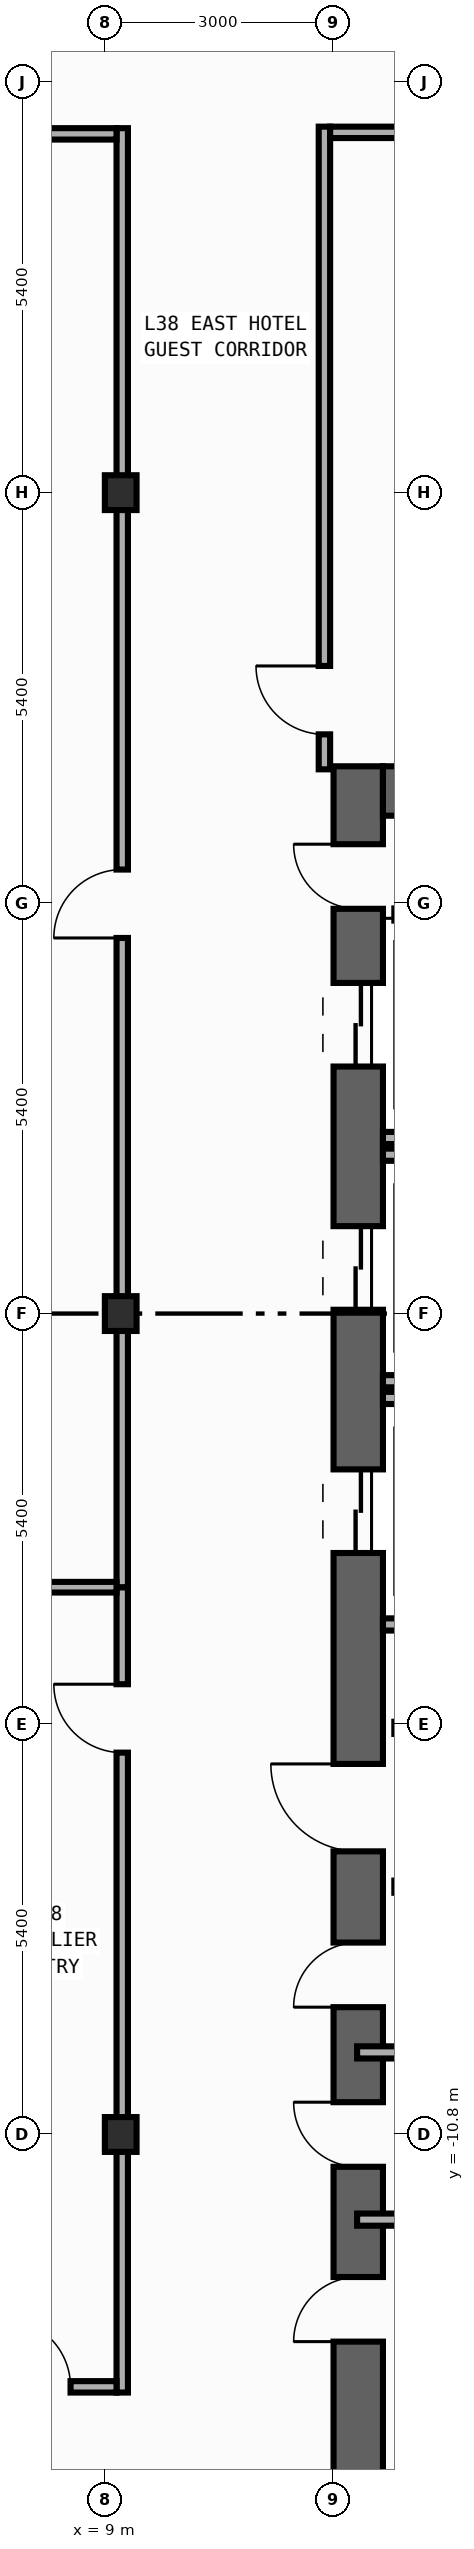
"""IFC4 building model, lengths in metres.
Left out: names, types, materials, properties, quantities, classifications, styles, units other than length and angle.
Written with IfcOpenShell. Run it as: python <this file> out.ifc"""

import sys

from ifc_helpers import new_model, si_unit, direction, frame, frame_2d, origin, origin_2d, place, context, subcontext, project, spatial, rectangle, i_section, extrude, element, fill, save


model = new_model("IFC4")
c1 = context("Model", 3, precision=1e-05, world=origin(), true_north=direction((0.0, 1.0)))
c2 = subcontext(c1, "Body", "Model", "MODEL_VIEW")
j1 = project(units=[si_unit("LENGTHUNIT", "METRE"), si_unit("PLANEANGLEUNIT", "RADIAN")], contexts=[c1])
p1 = place(None, origin())
s1 = spatial("IfcSite", under=j1, at=p1, CompositionType="ELEMENT")
p2 = place(p1, origin())
s2 = spatial("IfcBuilding", under=s1, at=p2, CompositionType="ELEMENT")
p3 = place(p2, frame((0.0, 0.0, 168.8)))
s3 = spatial("IfcBuildingStorey", under=s2, at=p3, CompositionType="ELEMENT", Elevation=168.8)
p4 = place(p3, frame((12.325, -19.8, 0.0), z_axis=(0.0, 0.0, 1.0), x_axis=(0.0, 1.0, 0.0)))
e1 = element("IfcWall", 1, at=p4, inside=s3, PredefinedType="SHEAR", context=c2, shape_type="SweptSolid", body=[
    extrude(rectangle(XDim=27.0, YDim=0.65, at=frame_2d((13.5, 0.0))), origin(), (0.0, 0.0, 1.0), 3.54),
])
p5 = place(p4, frame((23.05, 0.0, 0.0)))
e2 = element("IfcOpeningElement", 2, at=p5, cuts=e1, PredefinedType="OPENING", context=c2, shape_type="SweptSolid", body=[
    extrude(rectangle(XDim=1.1, YDim=2.2, at=frame_2d((0.55, 1.1))), frame((0.0, 0.335, 0.0), z_axis=(0.0, -1.0, 0.0), x_axis=(1.0, 0.0, 0.0)), (0.0, 0.0, 1.0), 0.67),
])
p6 = place(p4, frame((19.85, 0.0, 0.0)))
e3 = element("IfcOpeningElement", 3, at=p6, cuts=e1, PredefinedType="OPENING", context=c2, shape_type="SweptSolid", body=[
    extrude(rectangle(XDim=1.1, YDim=2.2, at=frame_2d((0.55, 1.1))), frame((0.0, 0.335, 0.0), z_axis=(0.0, -1.0, 0.0), x_axis=(1.0, 0.0, 0.0)), (0.0, 0.0, 1.0), 0.67),
])
p7 = place(p4, frame((16.65, 0.0, 0.0)))
e4 = element("IfcOpeningElement", 4, at=p7, cuts=e1, PredefinedType="OPENING", context=c2, shape_type="SweptSolid", body=[
    extrude(rectangle(XDim=1.1, YDim=2.2, at=frame_2d((0.55, 1.1))), frame((0.0, 0.335, 0.0), z_axis=(0.0, -1.0, 0.0), x_axis=(1.0, 0.0, 0.0)), (0.0, 0.0, 1.0), 0.67),
])
p8 = place(p4, frame((6.275, 0.0, 0.0)))
e5 = element("IfcOpeningElement", 5, at=p8, cuts=e1, PredefinedType="OPENING", context=c2, shape_type="SweptSolid", body=[
    extrude(rectangle(XDim=0.85, YDim=2.1, at=frame_2d((0.425, 1.05))), frame((0.0, 0.335, 0.0), z_axis=(0.0, -1.0, 0.0), x_axis=(1.0, 0.0, 0.0)), (0.0, 0.0, 1.0), 0.67),
])
p9 = place(p4, frame((8.575, 0.0, 0.0)))
e6 = element("IfcOpeningElement", 6, at=p9, cuts=e1, PredefinedType="OPENING", context=c2, shape_type="SweptSolid", body=[
    extrude(rectangle(XDim=0.85, YDim=2.1, at=frame_2d((0.425, 1.05))), frame((0.0, 0.335, 0.0), z_axis=(0.0, -1.0, 0.0), x_axis=(1.0, 0.0, 0.0)), (0.0, 0.0, 1.0), 0.67),
])
p10 = place(p4, frame((10.675, 0.0, 0.0)))
e7 = element("IfcOpeningElement", 7, at=p10, cuts=e1, PredefinedType="OPENING", context=c2, shape_type="SweptSolid", body=[
    extrude(rectangle(XDim=0.85, YDim=2.1, at=frame_2d((0.425, 1.05))), frame((0.0, 0.335, 0.0), z_axis=(0.0, -1.0, 0.0), x_axis=(1.0, 0.0, 0.0)), (0.0, 0.0, 1.0), 0.67),
])
p11 = place(p4, frame((12.725, 0.0, 0.0)))
e8 = element("IfcOpeningElement", 8, at=p11, cuts=e1, PredefinedType="OPENING", context=c2, shape_type="SweptSolid", body=[
    extrude(rectangle(XDim=1.15, YDim=2.2, at=frame_2d((0.575, 1.1))), frame((0.0, 0.335, 0.0), z_axis=(0.0, -1.0, 0.0), x_axis=(1.0, 0.0, 0.0)), (0.0, 0.0, 1.0), 0.67),
])
p12 = place(p4, frame((25.125, 0.0, 0.0)))
e9 = element("IfcOpeningElement", 9, at=p12, cuts=e1, PredefinedType="OPENING", context=c2, shape_type="SweptSolid", body=[
    extrude(rectangle(XDim=0.85, YDim=2.1, at=frame_2d((0.425, 1.05))), frame((0.0, 0.335, 0.0), z_axis=(0.0, -1.0, 0.0), x_axis=(1.0, 0.0, 0.0)), (0.0, 0.0, 1.0), 0.67),
])
p13 = place(p3, frame((12.65, 6.875, 0.0), z_axis=(0.0, 0.0, 1.0), x_axis=(1.0, 0.0, 0.0)))
e10 = element("IfcWall", 10, at=p13, inside=s3, PredefinedType="SHEAR", context=c2, shape_type="SweptSolid", body=[
    extrude(rectangle(XDim=7.1, YDim=0.65, at=frame_2d((3.55, 0.0))), origin(), (0.0, 0.0, 1.0), 3.54),
])
for number, where, z_axis, x_axis in (
    (11, (9.2, -10.8, 0.0), (0.0, 0.0, 1.0), (1.0, 0.0, 0.0)),
    (12, (9.2, 0.0, 0.0), (0.0, 0.0, 1.0), (1.0, 0.0, 0.0)),
    (13, (9.2, 10.8, 0.0), (0.0, 0.0, 1.0), (1.0, 0.0, 0.0)),
):
    element("IfcColumn", number, at=place(p3, frame(where, z_axis=z_axis, x_axis=x_axis)), inside=s3, PredefinedType="COLUMN", context=c2, shape_type="SweptSolid", body=[
        extrude(i_section(OverallWidth=0.417, OverallDepth=0.458, WebThickness=0.03, FlangeThickness=0.05, FilletRadius=0.022, at=origin_2d()), origin(), (0.0, 0.0, 1.0), 3.8),
    ])
for number, where, z_axis, x_axis in (
    (14, (12.65, 2.31, 0.0), (0.0, 0.0, 1.0), (1.0, 0.0, 0.0)),
    (15, (12.65, -0.89, 0.0), (0.0, 0.0, 1.0), (1.0, 0.0, 0.0)),
    (16, (12.65, 2.09, 0.0), (0.0, 0.0, 1.0), (1.0, 0.0, 0.0)),
    (17, (12.65, -4.09, 0.0), (0.0, 0.0, 1.0), (1.0, 0.0, 0.0)),
    (18, (12.65, -1.11, 0.0), (0.0, 0.0, 1.0), (1.0, 0.0, 0.0)),
):
    element("IfcWall", number, at=place(p3, frame(where, z_axis=z_axis, x_axis=x_axis)), inside=s3, PredefinedType="STANDARD", context=c2, shape_type="SweptSolid", body=[
        extrude(rectangle(XDim=2.34, YDim=0.16, at=frame_2d((1.17, 0.0))), origin(), (0.0, 0.0, 1.0), 3.54),
    ])
for number, where, z_axis, x_axis in (
    (19, (12.8, -5.45, 0.0), (0.0, 0.0, 1.0), (1.0, 0.0, 0.0)),
    (20, (12.8, -7.54, 0.0), (0.0, 0.0, 1.0), (1.0, 0.0, 0.0)),
    (21, (12.8, 5.25, 0.0), (0.0, 0.0, 1.0), (1.0, 0.0, 0.0)),
):
    element("IfcWall", number, at=place(p3, frame(where, z_axis=z_axis, x_axis=x_axis)), inside=s3, PredefinedType="STANDARD", context=c2, shape_type="SweptSolid", body=[
        extrude(rectangle(XDim=2.6, YDim=0.16, at=frame_2d((1.3, 0.0))), origin(), (0.0, 0.0, 1.0), 3.54),
    ])
for number, where, z_axis, x_axis in (
    (22, (12.31, -11.92, 0.0), (0.0, 0.0, 1.0), (1.0, 0.0, 0.0)),
    (23, (12.31, -9.72, 0.0), (0.0, 0.0, 1.0), (1.0, 0.0, 0.0)),
):
    element("IfcWall", number, at=place(p3, frame(where, z_axis=z_axis, x_axis=x_axis)), inside=s3, PredefinedType="PARTITIONING", context=c2, shape_type="SweptSolid", body=[
        extrude(rectangle(XDim=3.065, YDim=0.16, at=frame_2d((1.532, 0.0))), origin(), (0.0, 0.0, 1.0), 3.54),
    ])
p14 = place(p3, frame((9.22, -14.195, 0.0), z_axis=(0.0, 0.0, 1.0), x_axis=(0.0, 1.0, 0.0)))
e24 = element("IfcWall", 24, at=p14, inside=s3, PredefinedType="PARTITIONING", context=c2, shape_type="SweptSolid", body=[
    extrude(rectangle(XDim=10.595, YDim=0.15, at=frame_2d((5.297, 0.0))), origin(), (0.0, 0.0, 1.0), 2.952),
])
p15 = place(p14, frame((8.419, 0.0, 0.0)))
e25 = element("IfcOpeningElement", 25, at=p15, cuts=e24, PredefinedType="OPENING", context=c2, shape_type="SweptSolid", body=[
    extrude(rectangle(XDim=0.9, YDim=2.15, at=frame_2d((0.45, 1.075))), frame((0.0, 0.085, 0.0), z_axis=(0.0, -1.0, 0.0), x_axis=(1.0, 0.0, 0.0)), (0.0, 0.0, 1.0), 0.17),
])
p16 = place(p3, frame((9.22, -3.6, 0.0), z_axis=(0.0, 0.0, 1.0), x_axis=(0.0, 1.0, 0.0)))
e26 = element("IfcWall", 26, at=p16, inside=s3, PredefinedType="PARTITIONING", context=c2, shape_type="SweptSolid", body=[
    extrude(rectangle(XDim=19.195, YDim=0.15, at=frame_2d((9.598, 0.0))), origin(), (0.0, 0.0, 1.0), 2.952),
])
p17 = place(p16, frame((8.542, 0.0, 0.0)))
e27 = element("IfcOpeningElement", 27, at=p17, cuts=e26, PredefinedType="OPENING", context=c2, shape_type="SweptSolid", body=[
    extrude(rectangle(XDim=0.9, YDim=2.15, at=frame_2d((0.45, 1.075))), frame((0.0, 0.085, 0.0), z_axis=(0.0, -1.0, 0.0), x_axis=(1.0, 0.0, 0.0)), (0.0, 0.0, 1.0), 0.17),
])
p18 = place(p3, frame((11.88, 7.16, 0.0), z_axis=(0.0, 0.0, 1.0), x_axis=(0.0, 1.0, 0.0)))
e28 = element("IfcWall", 28, at=p18, inside=s3, PredefinedType="PARTITIONING", context=c2, shape_type="SweptSolid", body=[
    extrude(rectangle(XDim=8.455, YDim=0.15, at=frame_2d((4.228, 0.0))), origin(), (0.0, 0.0, 1.0), 3.54),
])
p19 = place(p18, frame((0.46, 0.0, 0.0)))
e29 = element("IfcOpeningElement", 29, at=p19, cuts=e28, PredefinedType="OPENING", context=c2, shape_type="SweptSolid", body=[
    extrude(rectangle(XDim=0.9, YDim=2.15, at=frame_2d((0.45, 1.075))), frame((0.0, 0.085, 0.0), z_axis=(0.0, -1.0, 0.0), x_axis=(1.0, 0.0, 0.0)), (0.0, 0.0, 1.0), 0.17),
])
p20 = place(p3, frame((-9.145, 15.52, 0.0), z_axis=(0.0, 0.0, 1.0), x_axis=(1.0, 0.0, 0.0)))
e30 = element("IfcWall", 30, at=p20, inside=s3, PredefinedType="PARTITIONING", context=c2, shape_type="SweptSolid", body=[
    extrude(rectangle(XDim=18.29, YDim=0.15, at=frame_2d((9.145, 0.0))), origin(), (0.0, 0.0, 1.0), 3.54),
])
p21 = place(p20, frame((15.725, 0.0, 0.0)))
e31 = element("IfcOpeningElement", 31, at=p21, cuts=e30, PredefinedType="OPENING", context=c2, shape_type="SweptSolid", body=[
    extrude(rectangle(XDim=0.9, YDim=2.15, at=frame_2d((0.45, 1.075))), frame((0.0, 0.085, 0.0), z_axis=(0.0, -1.0, 0.0), x_axis=(1.0, 0.0, 0.0)), (0.0, 0.0, 1.0), 0.17),
])
p22 = place(p3, frame((11.955, 15.54, 0.0), z_axis=(0.0, 0.0, 1.0), x_axis=(1.0, 0.0, 0.0)))
e32 = element("IfcWall", 32, at=p22, inside=s3, PredefinedType="PARTITIONING", context=c2, shape_type="SweptSolid", body=[
    extrude(rectangle(XDim=10.5, YDim=0.15, at=frame_2d((5.25, 0.0))), origin(), (0.0, 0.0, 1.0), 3.54),
])
p23 = place(p22, frame((4.901, 0.0, 0.0)))
e33 = element("IfcOpeningElement", 33, at=p23, cuts=e32, PredefinedType="OPENING", context=c2, shape_type="SweptSolid", body=[
    extrude(rectangle(XDim=0.9, YDim=2.15, at=frame_2d((0.45, 1.075))), frame((0.0, 0.085, 0.0), z_axis=(0.0, -1.0, 0.0), x_axis=(1.0, 0.0, 0.0)), (0.0, 0.0, 1.0), 0.17),
])
p24 = place(p3, frame((7.18, -14.12, 0.0), z_axis=(0.0, 0.0, 1.0), x_axis=(1.0, 0.0, 0.0)))
e34 = element("IfcWall", 34, at=p24, inside=s3, PredefinedType="PARTITIONING", context=c2, shape_type="SweptSolid", body=[
    extrude(rectangle(XDim=1.965, YDim=0.15, at=frame_2d((0.982, 0.0))), origin(), (0.0, 0.0, 1.0), 3.54),
])
p25 = place(p24, frame((0.46, 0.0, 0.0)))
e35 = element("IfcOpeningElement", 35, at=p25, cuts=e34, PredefinedType="OPENING", context=c2, shape_type="SweptSolid", body=[
    extrude(rectangle(XDim=0.9, YDim=2.15, at=frame_2d((0.45, 1.075))), frame((0.0, 0.085, 0.0), z_axis=(0.0, -1.0, 0.0), x_axis=(1.0, 0.0, 0.0)), (0.0, 0.0, 1.0), 0.17),
])
p26 = place(p3, frame((7.02, -3.6, 0.0), z_axis=(0.0, 0.0, 1.0), x_axis=(1.0, 0.0, 0.0)))
e36 = element("IfcWall", 36, at=p26, inside=s3, PredefinedType="PARTITIONING", context=c2, shape_type="SweptSolid", body=[
    extrude(rectangle(XDim=2.125, YDim=0.14, at=frame_2d((1.062, 0.0))), origin(), (0.0, 0.0, 1.0), 3.54),
])
p27 = place(p5, origin())
e37 = element("IfcDoor", 37, at=p27, inside=s3, OperationType="DOUBLE_DOOR_SLIDING", PredefinedType="DOOR", context=c2, shape_type="SweptSolid", body=[
    extrude(rectangle(XDim=1.1, YDim=2.2, at=frame_2d((0.55, 1.1))), frame((0.0, 0.025, 0.0), z_axis=(0.0, -1.0, 0.0), x_axis=(1.0, 0.0, 0.0)), (0.0, 0.0, 1.0), 0.05),
])
fill(e2, e37)
p28 = place(p6, origin())
e38 = element("IfcDoor", 38, at=p28, inside=s3, OperationType="DOUBLE_DOOR_SLIDING", PredefinedType="DOOR", context=c2, shape_type="SweptSolid", body=[
    extrude(rectangle(XDim=1.1, YDim=2.2, at=frame_2d((0.55, 1.1))), frame((0.0, 0.025, 0.0), z_axis=(0.0, -1.0, 0.0), x_axis=(1.0, 0.0, 0.0)), (0.0, 0.0, 1.0), 0.05),
])
fill(e3, e38)
p29 = place(p7, origin())
e39 = element("IfcDoor", 39, at=p29, inside=s3, OperationType="DOUBLE_DOOR_SLIDING", PredefinedType="DOOR", context=c2, shape_type="SweptSolid", body=[
    extrude(rectangle(XDim=1.1, YDim=2.2, at=frame_2d((0.55, 1.1))), frame((0.0, 0.025, 0.0), z_axis=(0.0, -1.0, 0.0), x_axis=(1.0, 0.0, 0.0)), (0.0, 0.0, 1.0), 0.05),
])
fill(e4, e39)
p30 = place(p8, origin())
e40 = element("IfcDoor", 40, at=p30, inside=s3, OperationType="SINGLE_SWING_LEFT", PredefinedType="DOOR", context=c2, shape_type="SweptSolid", body=[
    extrude(rectangle(XDim=0.85, YDim=2.1, at=frame_2d((0.425, 1.05))), frame((0.0, 0.025, 0.0), z_axis=(0.0, -1.0, 0.0), x_axis=(1.0, 0.0, 0.0)), (0.0, 0.0, 1.0), 0.05),
])
fill(e5, e40)
p31 = place(p9, origin())
e41 = element("IfcDoor", 41, at=p31, inside=s3, OperationType="SINGLE_SWING_RIGHT", PredefinedType="DOOR", context=c2, shape_type="SweptSolid", body=[
    extrude(rectangle(XDim=0.85, YDim=2.1, at=frame_2d((0.425, 1.05))), frame((0.0, 0.025, 0.0), z_axis=(0.0, -1.0, 0.0), x_axis=(1.0, 0.0, 0.0)), (0.0, 0.0, 1.0), 0.05),
])
fill(e6, e41)
p32 = place(p10, origin())
e42 = element("IfcDoor", 42, at=p32, inside=s3, OperationType="SINGLE_SWING_LEFT", PredefinedType="DOOR", context=c2, shape_type="SweptSolid", body=[
    extrude(rectangle(XDim=0.85, YDim=2.1, at=frame_2d((0.425, 1.05))), frame((0.0, 0.025, 0.0), z_axis=(0.0, -1.0, 0.0), x_axis=(1.0, 0.0, 0.0)), (0.0, 0.0, 1.0), 0.05),
])
fill(e7, e42)
p33 = place(p11, origin())
e43 = element("IfcDoor", 43, at=p33, inside=s3, OperationType="SINGLE_SWING_RIGHT", PredefinedType="DOOR", context=c2, shape_type="SweptSolid", body=[
    extrude(rectangle(XDim=1.15, YDim=2.2, at=frame_2d((0.575, 1.1))), frame((0.0, 0.025, 0.0), z_axis=(0.0, -1.0, 0.0), x_axis=(1.0, 0.0, 0.0)), (0.0, 0.0, 1.0), 0.05),
])
fill(e8, e43)
p34 = place(p12, origin())
e44 = element("IfcDoor", 44, at=p34, inside=s3, OperationType="SINGLE_SWING_RIGHT", PredefinedType="DOOR", context=c2, shape_type="SweptSolid", body=[
    extrude(rectangle(XDim=0.85, YDim=2.1, at=frame_2d((0.425, 1.05))), frame((0.0, 0.025, 0.0), z_axis=(0.0, -1.0, 0.0), x_axis=(1.0, 0.0, 0.0)), (0.0, 0.0, 1.0), 0.05),
])
fill(e9, e44)
p35 = place(p15, origin())
e45 = element("IfcDoor", 45, at=p35, inside=s3, OperationType="SINGLE_SWING_RIGHT", PredefinedType="DOOR", context=c2, shape_type="SweptSolid", body=[
    extrude(rectangle(XDim=0.9, YDim=2.15, at=frame_2d((0.45, 1.075))), frame((0.0, 0.025, 0.0), z_axis=(0.0, -1.0, 0.0), x_axis=(1.0, 0.0, 0.0)), (0.0, 0.0, 1.0), 0.05),
])
fill(e25, e45)
p36 = place(p17, origin())
e46 = element("IfcDoor", 46, at=p36, inside=s3, OperationType="SINGLE_SWING_LEFT", PredefinedType="DOOR", context=c2, shape_type="SweptSolid", body=[
    extrude(rectangle(XDim=0.9, YDim=2.15, at=frame_2d((0.45, 1.075))), frame((0.0, 0.025, 0.0), z_axis=(0.0, -1.0, 0.0), x_axis=(1.0, 0.0, 0.0)), (0.0, 0.0, 1.0), 0.05),
])
fill(e27, e46)
p37 = place(p19, origin())
e47 = element("IfcDoor", 47, at=p37, inside=s3, OperationType="SINGLE_SWING_RIGHT", PredefinedType="DOOR", context=c2, shape_type="SweptSolid", body=[
    extrude(rectangle(XDim=0.9, YDim=2.15, at=frame_2d((0.45, 1.075))), frame((0.0, 0.025, 0.0), z_axis=(0.0, -1.0, 0.0), x_axis=(1.0, 0.0, 0.0)), (0.0, 0.0, 1.0), 0.05),
])
fill(e29, e47)
p38 = place(p25, origin())
e48 = element("IfcDoor", 48, at=p38, inside=s3, OperationType="SINGLE_SWING_LEFT", PredefinedType="DOOR", context=c2, shape_type="SweptSolid", body=[
    extrude(rectangle(XDim=0.9, YDim=2.15, at=frame_2d((0.45, 1.075))), frame((0.0, 0.025, 0.0), z_axis=(0.0, -1.0, 0.0), x_axis=(1.0, 0.0, 0.0)), (0.0, 0.0, 1.0), 0.05),
])
fill(e35, e48)
save(model, sys.argv[1])
